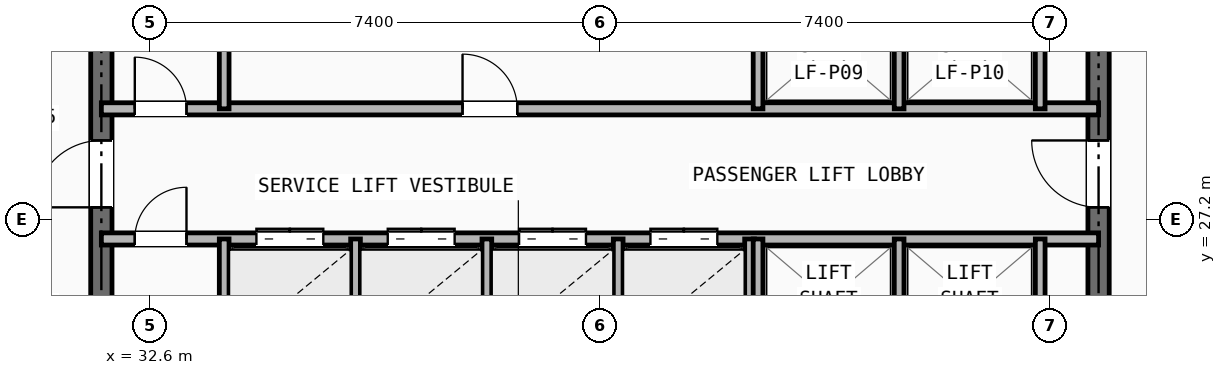
"""IFC4 building model, lengths in metres.
Left out: names, types, materials, properties, quantities, classifications, styles, units other than length and angle.
Written with IfcOpenShell. Run it as: python <this file> out.ifc"""

import sys

from ifc_helpers import new_model, si_unit, direction, frame, frame_2d, origin, place, context, subcontext, project, spatial, rectangle, extrude, element, fill, save


model = new_model("IFC4")
c1 = context("Model", 3, precision=1e-05, world=origin(), true_north=direction((0.0, 1.0)))
c2 = subcontext(c1, "Body", "Model", "MODEL_VIEW")
j1 = project(units=[si_unit("LENGTHUNIT", "METRE"), si_unit("PLANEANGLEUNIT", "RADIAN")], contexts=[c1])
p1 = place(None, origin())
s1 = spatial("IfcSite", under=j1, at=p1, CompositionType="ELEMENT")
p2 = place(p1, origin())
s2 = spatial("IfcBuilding", under=s1, at=p2, CompositionType="ELEMENT")
p3 = place(p2, frame((0.0, 0.0, 150.5)))
s3 = spatial("IfcBuildingStorey", under=s2, at=p3, CompositionType="ELEMENT", Elevation=150.5)
p4 = place(p3, frame((31.8, 16.4, 0.0), z_axis=(0.0, 0.0, 1.0), x_axis=(0.0, 1.0, 0.0)))
e1 = element("IfcWall", 1, at=p4, inside=s3, PredefinedType="SHEAR", context=c2, shape_type="SweptSolid", body=[
    extrude(rectangle(XDim=14.8, YDim=0.35, at=frame_2d((7.4, 0.0))), origin(), (0.0, 0.0, 1.0), 3.21),
])
p5 = place(p4, frame((11.0, 0.0, 0.0)))
e2 = element("IfcOpeningElement", 2, at=p5, cuts=e1, PredefinedType="OPENING", context=c2, shape_type="SweptSolid", body=[
    extrude(rectangle(XDim=1.1, YDim=2.15, at=frame_2d((0.55, 1.075))), frame((0.0, 0.185, 0.0), z_axis=(0.0, -1.0, 0.0), x_axis=(1.0, 0.0, 0.0)), (0.0, 0.0, 1.0), 0.37),
])
p6 = place(p3, frame((48.2, 16.4, 0.0), z_axis=(0.0, 0.0, 1.0), x_axis=(0.0, 1.0, 0.0)))
e3 = element("IfcWall", 3, at=p6, inside=s3, PredefinedType="SHEAR", context=c2, shape_type="SweptSolid", body=[
    extrude(rectangle(XDim=14.8, YDim=0.35, at=frame_2d((7.4, 0.0))), origin(), (0.0, 0.0, 1.0), 3.21),
])
p7 = place(p6, frame((11.0, 0.0, 0.0)))
e4 = element("IfcOpeningElement", 4, at=p7, cuts=e3, PredefinedType="OPENING", context=c2, shape_type="SweptSolid", body=[
    extrude(rectangle(XDim=1.1, YDim=2.15, at=frame_2d((0.55, 1.075))), frame((0.0, 0.185, 0.0), z_axis=(0.0, -1.0, 0.0), x_axis=(1.0, 0.0, 0.0)), (0.0, 0.0, 1.0), 0.37),
])
p8 = place(p3, frame((31.8, 29.02, 0.0), z_axis=(0.0, 0.0, 1.0), x_axis=(1.0, 0.0, 0.0)))
e5 = element("IfcWall", 5, at=p8, inside=s3, PredefinedType="SOLIDWALL", context=c2, shape_type="SweptSolid", body=[
    extrude(rectangle(XDim=16.4, YDim=0.2, at=frame_2d((8.2, 0.0))), origin(), (0.0, 0.0, 1.0), 2.661),
])
p9 = place(p8, frame((0.55, 0.0, 0.0)))
e6 = element("IfcOpeningElement", 6, at=p9, cuts=e5, PredefinedType="OPENING", context=c2, shape_type="SweptSolid", body=[
    extrude(rectangle(XDim=0.85, YDim=2.05, at=frame_2d((0.425, 1.025))), frame((0.0, 0.11, 0.0), z_axis=(0.0, -1.0, 0.0), x_axis=(1.0, 0.0, 0.0)), (0.0, 0.0, 1.0), 0.22),
])
p10 = place(p8, frame((5.94, 0.0, 0.0)))
e7 = element("IfcOpeningElement", 7, at=p10, cuts=e5, PredefinedType="OPENING", context=c2, shape_type="SweptSolid", body=[
    extrude(rectangle(XDim=0.9, YDim=2.1, at=frame_2d((0.45, 1.05))), frame((0.0, 0.11, 0.0), z_axis=(0.0, -1.0, 0.0), x_axis=(1.0, 0.0, 0.0)), (0.0, 0.0, 1.0), 0.22),
])
p11 = place(p3, frame((31.8, 26.88, 0.0), z_axis=(0.0, 0.0, 1.0), x_axis=(1.0, 0.0, 0.0)))
e8 = element("IfcWall", 8, at=p11, inside=s3, PredefinedType="SOLIDWALL", context=c2, shape_type="SweptSolid", body=[
    extrude(rectangle(XDim=16.4, YDim=0.2, at=frame_2d((8.2, 0.0))), origin(), (0.0, 0.0, 1.0), 2.661),
])
p12 = place(p11, frame((0.55, 0.0, 0.0)))
e9 = element("IfcOpeningElement", 9, at=p12, cuts=e8, PredefinedType="OPENING", context=c2, shape_type="SweptSolid", body=[
    extrude(rectangle(XDim=0.85, YDim=2.05, at=frame_2d((0.425, 1.025))), frame((0.0, 0.11, 0.0), z_axis=(0.0, -1.0, 0.0), x_axis=(1.0, 0.0, 0.0)), (0.0, 0.0, 1.0), 0.22),
])
p13 = place(p11, frame((2.55, 0.0, 0.0)))
e10 = element("IfcOpeningElement", 10, at=p13, cuts=e8, PredefinedType="OPENING", context=c2, shape_type="SweptSolid", body=[
    extrude(rectangle(XDim=1.1, YDim=2.15, at=frame_2d((0.55, 1.075))), frame((0.0, 0.11, 0.0), z_axis=(0.0, -1.0, 0.0), x_axis=(1.0, 0.0, 0.0)), (0.0, 0.0, 1.0), 0.22),
])
p14 = place(p11, frame((4.71, 0.0, 0.0)))
e11 = element("IfcOpeningElement", 11, at=p14, cuts=e8, PredefinedType="OPENING", context=c2, shape_type="SweptSolid", body=[
    extrude(rectangle(XDim=1.1, YDim=2.15, at=frame_2d((0.55, 1.075))), frame((0.0, 0.11, 0.0), z_axis=(0.0, -1.0, 0.0), x_axis=(1.0, 0.0, 0.0)), (0.0, 0.0, 1.0), 0.22),
])
p15 = place(p11, frame((6.87, 0.0, 0.0)))
e12 = element("IfcOpeningElement", 12, at=p15, cuts=e8, PredefinedType="OPENING", context=c2, shape_type="SweptSolid", body=[
    extrude(rectangle(XDim=1.1, YDim=2.15, at=frame_2d((0.55, 1.075))), frame((0.0, 0.11, 0.0), z_axis=(0.0, -1.0, 0.0), x_axis=(1.0, 0.0, 0.0)), (0.0, 0.0, 1.0), 0.22),
])
p16 = place(p11, frame((9.03, 0.0, 0.0)))
e13 = element("IfcOpeningElement", 13, at=p16, cuts=e8, PredefinedType="OPENING", context=c2, shape_type="SweptSolid", body=[
    extrude(rectangle(XDim=1.1, YDim=2.15, at=frame_2d((0.55, 1.075))), frame((0.0, 0.11, 0.0), z_axis=(0.0, -1.0, 0.0), x_axis=(1.0, 0.0, 0.0)), (0.0, 0.0, 1.0), 0.22),
])
p17 = place(p3, frame((33.82, 29.02, 0.0), z_axis=(0.0, 0.0, 1.0), x_axis=(0.0, 1.0, 0.0)))
e14 = element("IfcWall", 14, at=p17, inside=s3, PredefinedType="SOLIDWALL", context=c2, shape_type="SweptSolid", body=[
    extrude(rectangle(XDim=2.18, YDim=0.16, at=frame_2d((1.09, 0.0))), origin(), (0.0, 0.0, 1.0), 2.661),
])
for number, where, z_axis, x_axis in (
    (15, (33.82, 24.8, 0.0), (0.0, 0.0, 1.0), (0.0, 1.0, 0.0)),
    (16, (35.98, 24.8, 0.0), (0.0, 0.0, 1.0), (0.0, 1.0, 0.0)),
    (17, (38.14, 24.8, 0.0), (0.0, 0.0, 1.0), (0.0, 1.0, 0.0)),
    (18, (40.3, 24.8, 0.0), (0.0, 0.0, 1.0), (0.0, 1.0, 0.0)),
    (19, (42.46, 24.8, 0.0), (0.0, 0.0, 1.0), (0.0, 1.0, 0.0)),
):
    element("IfcWall", number, at=place(p3, frame(where, z_axis=z_axis, x_axis=x_axis)), inside=s3, PredefinedType="SOLIDWALL", context=c2, shape_type="SweptSolid", body=[
        extrude(rectangle(XDim=2.08, YDim=0.16, at=frame_2d((1.04, 0.0))), origin(), (0.0, 0.0, 1.0), 3.21),
    ])
for number, where, z_axis, x_axis in (
    (20, (42.6, 29.02, 0.0), (0.0, 0.0, 1.0), (0.0, 1.0, 0.0)),
    (21, (44.92, 29.02, 0.0), (0.0, 0.0, 1.0), (0.0, 1.0, 0.0)),
    (22, (47.24, 29.02, 0.0), (0.0, 0.0, 1.0), (0.0, 1.0, 0.0)),
):
    element("IfcWall", number, at=place(p3, frame(where, z_axis=z_axis, x_axis=x_axis)), inside=s3, PredefinedType="SOLIDWALL", context=c2, shape_type="SweptSolid", body=[
        extrude(rectangle(XDim=2.18, YDim=0.16, at=frame_2d((1.09, 0.0))), origin(), (0.0, 0.0, 1.0), 2.661),
    ])
for number, where, z_axis, x_axis in (
    (23, (42.6, 24.8, 0.0), (0.0, 0.0, 1.0), (0.0, 1.0, 0.0)),
    (24, (44.92, 24.8, 0.0), (0.0, 0.0, 1.0), (0.0, 1.0, 0.0)),
    (25, (47.24, 24.8, 0.0), (0.0, 0.0, 1.0), (0.0, 1.0, 0.0)),
):
    element("IfcWall", number, at=place(p3, frame(where, z_axis=z_axis, x_axis=x_axis)), inside=s3, PredefinedType="SOLIDWALL", context=c2, shape_type="SweptSolid", body=[
        extrude(rectangle(XDim=2.08, YDim=0.16, at=frame_2d((1.04, 0.0))), origin(), (0.0, 0.0, 1.0), 3.21),
    ])
p18 = place(p9, origin())
e26 = element("IfcDoor", 26, at=p18, inside=s3, OperationType="SINGLE_SWING_LEFT", PredefinedType="DOOR", context=c2, shape_type="SweptSolid", body=[
    extrude(rectangle(XDim=0.85, YDim=2.05, at=frame_2d((0.425, 1.025))), frame((0.0, 0.025, 0.0), z_axis=(0.0, -1.0, 0.0), x_axis=(1.0, 0.0, 0.0)), (0.0, 0.0, 1.0), 0.05),
])
fill(e6, e26)
p19 = place(p12, origin())
e27 = element("IfcDoor", 27, at=p19, inside=s3, OperationType="SINGLE_SWING_RIGHT", PredefinedType="DOOR", context=c2, shape_type="SweptSolid", body=[
    extrude(rectangle(XDim=0.85, YDim=2.05, at=frame_2d((0.425, 1.025))), frame((0.0, 0.025, 0.0), z_axis=(0.0, -1.0, 0.0), x_axis=(1.0, 0.0, 0.0)), (0.0, 0.0, 1.0), 0.05),
])
fill(e9, e27)
p20 = place(p5, origin())
e28 = element("IfcDoor", 28, at=p20, inside=s3, OperationType="SINGLE_SWING_LEFT", PredefinedType="DOOR", context=c2, shape_type="SweptSolid", body=[
    extrude(rectangle(XDim=1.1, YDim=2.15, at=frame_2d((0.55, 1.075))), frame((0.0, 0.025, 0.0), z_axis=(0.0, -1.0, 0.0), x_axis=(1.0, 0.0, 0.0)), (0.0, 0.0, 1.0), 0.05),
])
fill(e2, e28)
p21 = place(p7, origin())
e29 = element("IfcDoor", 29, at=p21, inside=s3, OperationType="SINGLE_SWING_RIGHT", PredefinedType="DOOR", context=c2, shape_type="SweptSolid", body=[
    extrude(rectangle(XDim=1.1, YDim=2.15, at=frame_2d((0.55, 1.075))), frame((0.0, 0.025, 0.0), z_axis=(0.0, -1.0, 0.0), x_axis=(1.0, 0.0, 0.0)), (0.0, 0.0, 1.0), 0.05),
])
fill(e4, e29)
p22 = place(p10, origin())
e30 = element("IfcDoor", 30, at=p22, inside=s3, OperationType="SINGLE_SWING_LEFT", PredefinedType="DOOR", context=c2, shape_type="SweptSolid", body=[
    extrude(rectangle(XDim=0.9, YDim=2.1, at=frame_2d((0.45, 1.05))), frame((0.0, 0.025, 0.0), z_axis=(0.0, -1.0, 0.0), x_axis=(1.0, 0.0, 0.0)), (0.0, 0.0, 1.0), 0.05),
])
fill(e7, e30)
p23 = place(p13, origin())
e31 = element("IfcDoor", 31, at=p23, inside=s3, OperationType="DOUBLE_DOOR_SLIDING", PredefinedType="DOOR", context=c2, shape_type="SweptSolid", body=[
    extrude(rectangle(XDim=1.1, YDim=2.15, at=frame_2d((0.55, 1.075))), frame((0.0, 0.025, 0.0), z_axis=(0.0, -1.0, 0.0), x_axis=(1.0, 0.0, 0.0)), (0.0, 0.0, 1.0), 0.05),
])
fill(e10, e31)
p24 = place(p14, origin())
e32 = element("IfcDoor", 32, at=p24, inside=s3, OperationType="DOUBLE_DOOR_SLIDING", PredefinedType="DOOR", context=c2, shape_type="SweptSolid", body=[
    extrude(rectangle(XDim=1.1, YDim=2.15, at=frame_2d((0.55, 1.075))), frame((0.0, 0.025, 0.0), z_axis=(0.0, -1.0, 0.0), x_axis=(1.0, 0.0, 0.0)), (0.0, 0.0, 1.0), 0.05),
])
fill(e11, e32)
p25 = place(p15, origin())
e33 = element("IfcDoor", 33, at=p25, inside=s3, OperationType="DOUBLE_DOOR_SLIDING", PredefinedType="DOOR", context=c2, shape_type="SweptSolid", body=[
    extrude(rectangle(XDim=1.1, YDim=2.15, at=frame_2d((0.55, 1.075))), frame((0.0, 0.025, 0.0), z_axis=(0.0, -1.0, 0.0), x_axis=(1.0, 0.0, 0.0)), (0.0, 0.0, 1.0), 0.05),
])
fill(e12, e33)
p26 = place(p16, origin())
e34 = element("IfcDoor", 34, at=p26, inside=s3, OperationType="DOUBLE_DOOR_SLIDING", PredefinedType="DOOR", context=c2, shape_type="SweptSolid", body=[
    extrude(rectangle(XDim=1.1, YDim=2.15, at=frame_2d((0.55, 1.075))), frame((0.0, 0.025, 0.0), z_axis=(0.0, -1.0, 0.0), x_axis=(1.0, 0.0, 0.0)), (0.0, 0.0, 1.0), 0.05),
])
fill(e13, e34)
save(model, sys.argv[1])
